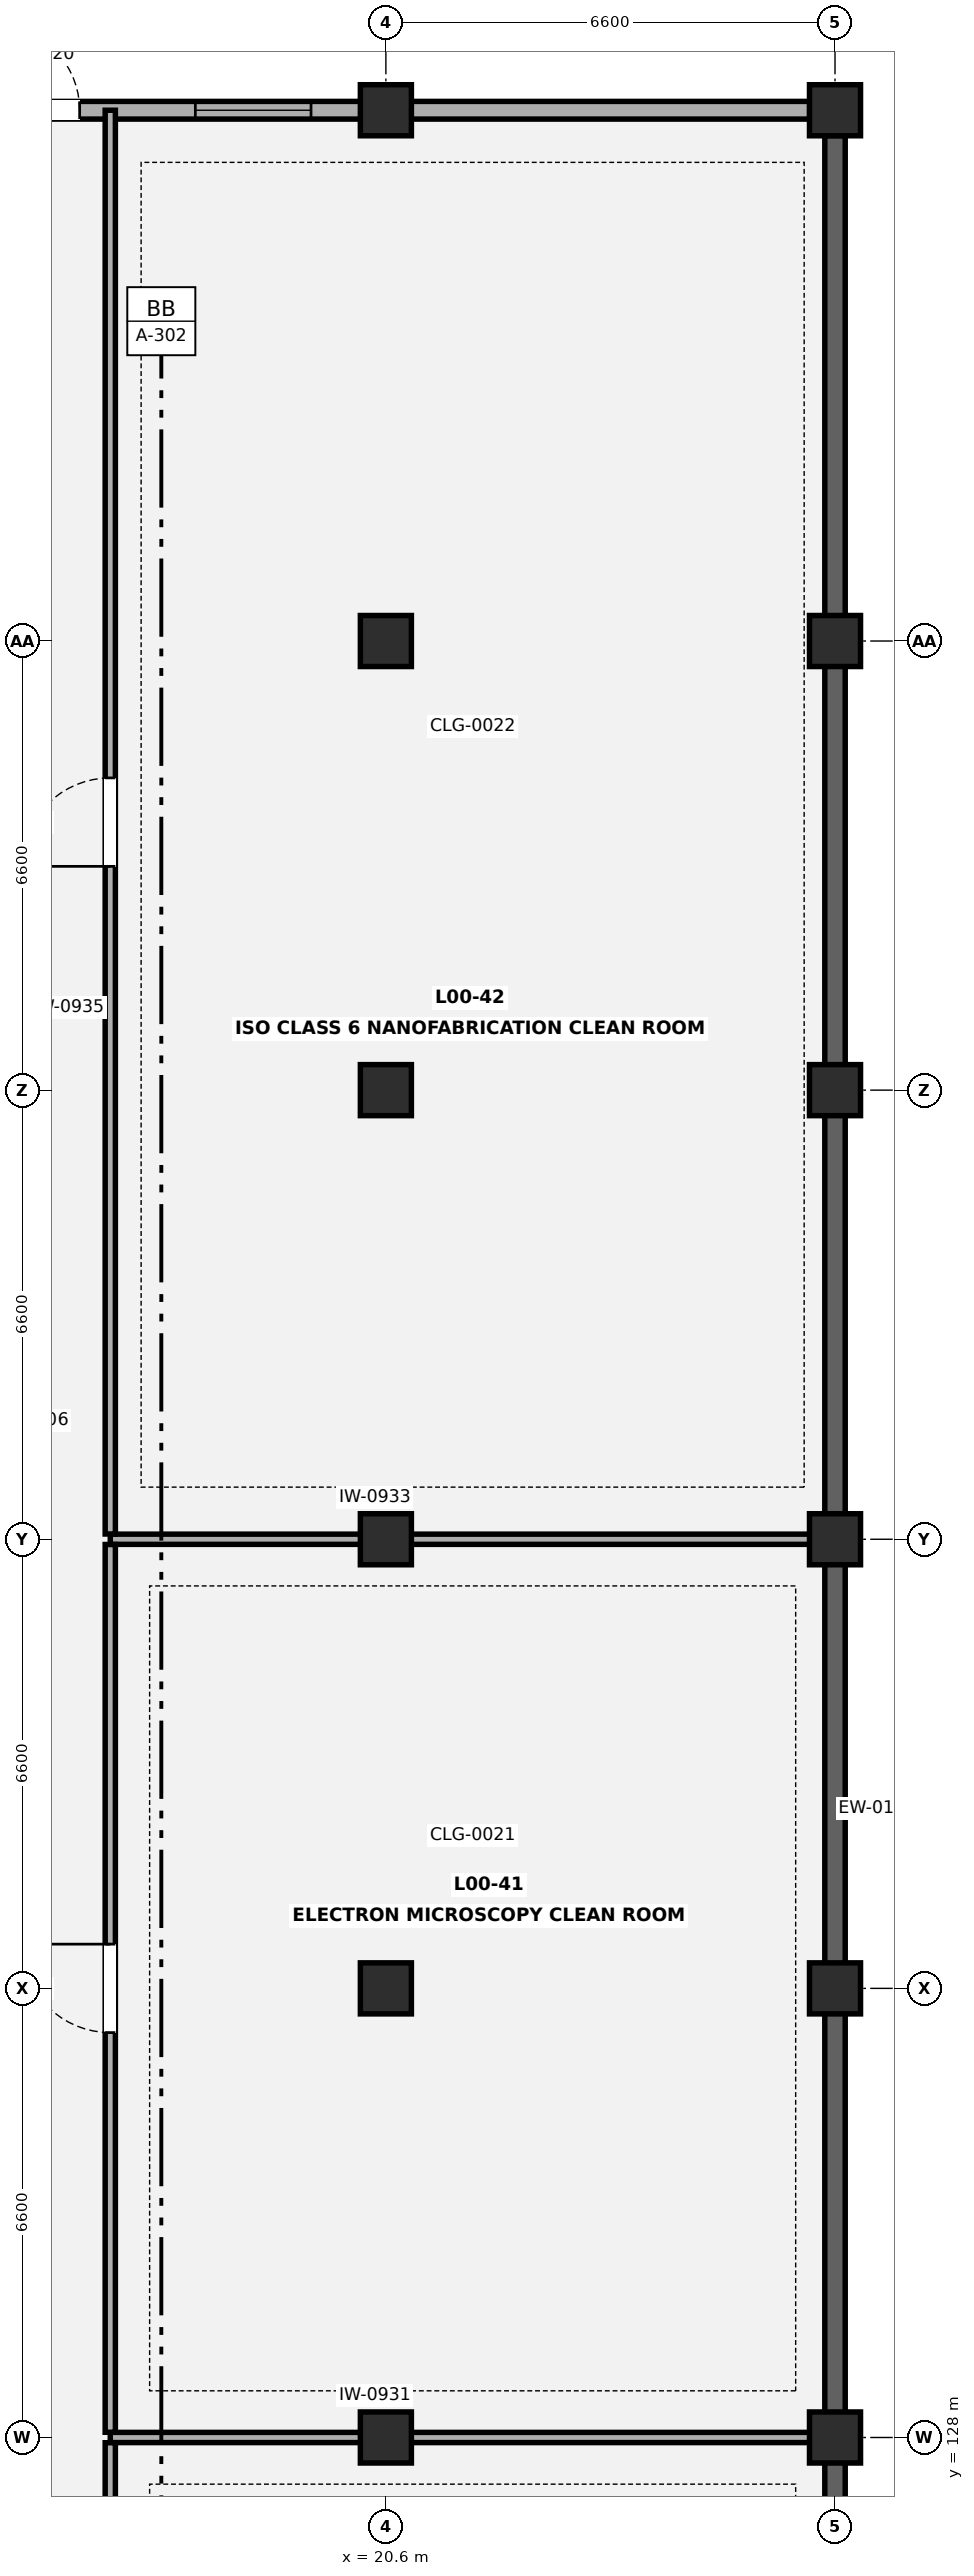
"""IFC4 building model, lengths in metres.
Left out: names, types, materials, properties, quantities, classifications, styles, units other than length and angle.
Written with IfcOpenShell. Run it as: python <this file> out.ifc"""

import sys

from ifc_helpers import new_model, si_unit, direction, frame, frame_2d, origin, origin_2d, place, context, subcontext, project, spatial, rectangle, extrude, element, fill, save


model = new_model("IFC4")
c1 = context("Model", 3, precision=1e-05, world=origin(), true_north=direction((0.0, 1.0)))
c2 = subcontext(c1, "Body", "Model", "MODEL_VIEW")
j1 = project(units=[si_unit("LENGTHUNIT", "METRE"), si_unit("PLANEANGLEUNIT", "RADIAN")], contexts=[c1])
p1 = place(None, origin())
s1 = spatial("IfcSite", under=j1, at=p1, CompositionType="ELEMENT")
p2 = place(p1, origin())
s2 = spatial("IfcBuilding", under=s1, at=p2, CompositionType="ELEMENT")
p3 = place(p2, origin())
s3 = spatial("IfcBuildingStorey", under=s2, at=p3, CompositionType="ELEMENT", Elevation=0.0)
for number, where, z_axis, x_axis in (
    (1, (20.6, 128.0, 0.0), (0.0, 0.0, 1.0), (1.0, 0.0, 0.0)),
    (2, (20.6, 134.6, 0.0), (0.0, 0.0, 1.0), (1.0, 0.0, 0.0)),
    (3, (20.6, 141.2, 0.0), (0.0, 0.0, 1.0), (1.0, 0.0, 0.0)),
    (4, (20.6, 147.8, 0.0), (0.0, 0.0, 1.0), (1.0, 0.0, 0.0)),
    (5, (20.6, 154.4, 0.0), (0.0, 0.0, 1.0), (1.0, 0.0, 0.0)),
    (6, (20.6, 162.2, 0.0), (0.0, 0.0, 1.0), (1.0, 0.0, 0.0)),
    (7, (27.2, 128.0, 0.0), (0.0, 0.0, 1.0), (1.0, 0.0, 0.0)),
    (8, (27.2, 134.6, 0.0), (0.0, 0.0, 1.0), (1.0, 0.0, 0.0)),
    (9, (27.2, 141.2, 0.0), (0.0, 0.0, 1.0), (1.0, 0.0, 0.0)),
    (10, (27.2, 147.8, 0.0), (0.0, 0.0, 1.0), (1.0, 0.0, 0.0)),
    (11, (27.2, 154.4, 0.0), (0.0, 0.0, 1.0), (1.0, 0.0, 0.0)),
    (12, (27.2, 162.2, 0.0), (0.0, 0.0, 1.0), (1.0, 0.0, 0.0)),
):
    element("IfcColumn", number, at=place(p3, frame(where, z_axis=z_axis, x_axis=x_axis)), inside=s3, PredefinedType="COLUMN", context=c2, shape_type="SweptSolid", body=[
        extrude(rectangle(XDim=0.75, YDim=0.75, at=origin_2d()), origin(), (0.0, 0.0, 1.0), 4.9),
    ])
p4 = place(p3, frame((27.2, 161.827, 0.0), z_axis=(0.0, 0.0, 1.0), x_axis=(0.0, -1.0, 0.0)))
e13 = element("IfcWall", 13, at=p4, inside=s3, PredefinedType="SOLIDWALL", context=c2, shape_type="SweptSolid", body=[
    extrude(rectangle(XDim=66.454, YDim=0.3, at=frame_2d((33.227, 0.0))), origin(), (0.0, 0.0, 1.0), 4.54),
])
p5 = place(p3, frame((7.773, 162.2, 0.0), z_axis=(0.0, 0.0, 1.0), x_axis=(1.0, 0.0, 0.0)))
e14 = element("IfcWall", 14, at=p5, inside=s3, PredefinedType="SOLIDWALL", context=c2, shape_type="SweptSolid", body=[
    extrude(rectangle(XDim=19.054, YDim=0.26, at=frame_2d((9.527, 0.0))), origin(), (0.0, 0.0, 1.0), 3.135),
])
p6 = place(p5, frame((7.077, 0.0, 0.0)))
e15 = element("IfcOpeningElement", 15, at=p6, cuts=e14, PredefinedType="OPENING", context=c2, shape_type="SweptSolid", body=[
    extrude(rectangle(XDim=1.25, YDim=2.15, at=frame_2d((0.625, 1.075))), frame((0.0, 0.14, 0.0), z_axis=(0.0, -1.0, 0.0), x_axis=(1.0, 0.0, 0.0)), (0.0, 0.0, 1.0), 0.28),
])
p7 = place(p5, frame((10.027, 0.0, 0.85)))
e16 = element("IfcOpeningElement", 16, at=p7, cuts=e14, PredefinedType="OPENING", context=c2, shape_type="SweptSolid", body=[
    extrude(rectangle(XDim=1.7, YDim=1.4, at=frame_2d((0.85, 0.7))), frame((0.0, 0.14, 0.0), z_axis=(0.0, -1.0, 0.0), x_axis=(1.0, 0.0, 0.0)), (0.0, 0.0, 1.0), 0.28),
])
p8 = place(p3, frame((16.55, 128.0, 0.0), z_axis=(0.0, 0.0, 1.0), x_axis=(1.0, 0.0, 0.0)))
e17 = element("IfcWall", 17, at=p8, inside=s3, PredefinedType="PARTITIONING", context=c2, shape_type="SweptSolid", body=[
    extrude(rectangle(XDim=10.508, YDim=0.15, at=frame_2d((5.254, 0.0))), origin(), (0.0, 0.0, 1.0), 3.135),
])
p9 = place(p3, frame((16.55, 114.877, 0.0), z_axis=(0.0, 0.0, 1.0), x_axis=(0.0, 1.0, 0.0)))
e18 = element("IfcWall", 18, at=p9, inside=s3, PredefinedType="PARTITIONING", context=c2, shape_type="SweptSolid", body=[
    extrude(rectangle(XDim=13.046, YDim=0.15, at=frame_2d((6.523, 0.0))), origin(), (0.0, 0.0, 1.0), 4.55),
])
p10 = place(p9, frame((5.873, 0.0, 0.0)))
e19 = element("IfcOpeningElement", 19, at=p10, cuts=e18, PredefinedType="OPENING", context=c2, shape_type="SweptSolid", body=[
    extrude(rectangle(XDim=1.3, YDim=2.2, at=frame_2d((0.65, 1.1))), frame((0.0, 0.085, 0.0), z_axis=(0.0, -1.0, 0.0), x_axis=(1.0, 0.0, 0.0)), (0.0, 0.0, 1.0), 0.17),
])
p11 = place(p3, frame((16.55, 141.2, 0.0), z_axis=(0.0, 0.0, 1.0), x_axis=(1.0, 0.0, 0.0)))
e20 = element("IfcWall", 20, at=p11, inside=s3, PredefinedType="PARTITIONING", context=c2, shape_type="SweptSolid", body=[
    extrude(rectangle(XDim=10.508, YDim=0.15, at=frame_2d((5.254, 0.0))), origin(), (0.0, 0.0, 1.0), 3.135),
])
p12 = place(p3, frame((16.55, 128.077, 0.0), z_axis=(0.0, 0.0, 1.0), x_axis=(0.0, 1.0, 0.0)))
e21 = element("IfcWall", 21, at=p12, inside=s3, PredefinedType="PARTITIONING", context=c2, shape_type="SweptSolid", body=[
    extrude(rectangle(XDim=13.046, YDim=0.15, at=frame_2d((6.523, 0.0))), origin(), (0.0, 0.0, 1.0), 4.55),
])
p13 = place(p12, frame((5.873, 0.0, 0.0)))
e22 = element("IfcOpeningElement", 22, at=p13, cuts=e21, PredefinedType="OPENING", context=c2, shape_type="SweptSolid", body=[
    extrude(rectangle(XDim=1.3, YDim=2.2, at=frame_2d((0.65, 1.1))), frame((0.0, 0.085, 0.0), z_axis=(0.0, -1.0, 0.0), x_axis=(1.0, 0.0, 0.0)), (0.0, 0.0, 1.0), 0.17),
])
p14 = place(p3, frame((16.55, 141.277, 0.0), z_axis=(0.0, 0.0, 1.0), x_axis=(0.0, 1.0, 0.0)))
e23 = element("IfcWall", 23, at=p14, inside=s3, PredefinedType="PARTITIONING", context=c2, shape_type="SweptSolid", body=[
    extrude(rectangle(XDim=20.923, YDim=0.15, at=frame_2d((10.461, 0.0))), origin(), (0.0, 0.0, 1.0), 4.55),
])
p15 = place(p14, frame((9.812, 0.0, 0.0)))
e24 = element("IfcOpeningElement", 24, at=p15, cuts=e23, PredefinedType="OPENING", context=c2, shape_type="SweptSolid", body=[
    extrude(rectangle(XDim=1.3, YDim=2.2, at=frame_2d((0.65, 1.1))), frame((0.0, 0.085, 0.0), z_axis=(0.0, -1.0, 0.0), x_axis=(1.0, 0.0, 0.0)), (0.0, 0.0, 1.0), 0.17),
])
p16 = place(p6, origin())
e25 = element("IfcDoor", 25, at=p16, inside=s3, OperationType="SINGLE_SWING_LEFT", PredefinedType="DOOR", context=c2, shape_type="SweptSolid", body=[
    extrude(rectangle(XDim=1.25, YDim=2.15, at=frame_2d((0.625, 1.075))), frame((0.0, 0.025, 0.0), z_axis=(0.0, -1.0, 0.0), x_axis=(1.0, 0.0, 0.0)), (0.0, 0.0, 1.0), 0.05),
])
fill(e15, e25)
p17 = place(p7, origin())
e26 = element("IfcWindow", 26, at=p17, inside=s3, PartitioningType="SINGLE_PANEL", PredefinedType="WINDOW", context=c2, shape_type="SweptSolid", body=[
    extrude(rectangle(XDim=1.7, YDim=1.4, at=frame_2d((0.85, 0.7))), frame((0.0, 0.03, 0.0), z_axis=(0.0, -1.0, 0.0), x_axis=(1.0, 0.0, 0.0)), (0.0, 0.0, 1.0), 0.06),
])
fill(e16, e26)
p18 = place(p13, origin())
e27 = element("IfcDoor", 27, at=p18, inside=s3, OperationType="SINGLE_SWING_RIGHT", PredefinedType="DOOR", context=c2, shape_type="SweptSolid", body=[
    extrude(rectangle(XDim=1.3, YDim=2.2, at=frame_2d((0.65, 1.1))), frame((0.0, 0.025, 0.0), z_axis=(0.0, -1.0, 0.0), x_axis=(1.0, 0.0, 0.0)), (0.0, 0.0, 1.0), 0.05),
])
fill(e22, e27)
p19 = place(p15, origin())
e28 = element("IfcDoor", 28, at=p19, inside=s3, OperationType="SINGLE_SWING_LEFT", PredefinedType="DOOR", context=c2, shape_type="SweptSolid", body=[
    extrude(rectangle(XDim=1.3, YDim=2.2, at=frame_2d((0.65, 1.1))), frame((0.0, 0.025, 0.0), z_axis=(0.0, -1.0, 0.0), x_axis=(1.0, 0.0, 0.0)), (0.0, 0.0, 1.0), 0.05),
])
fill(e24, e28)
save(model, sys.argv[1])
